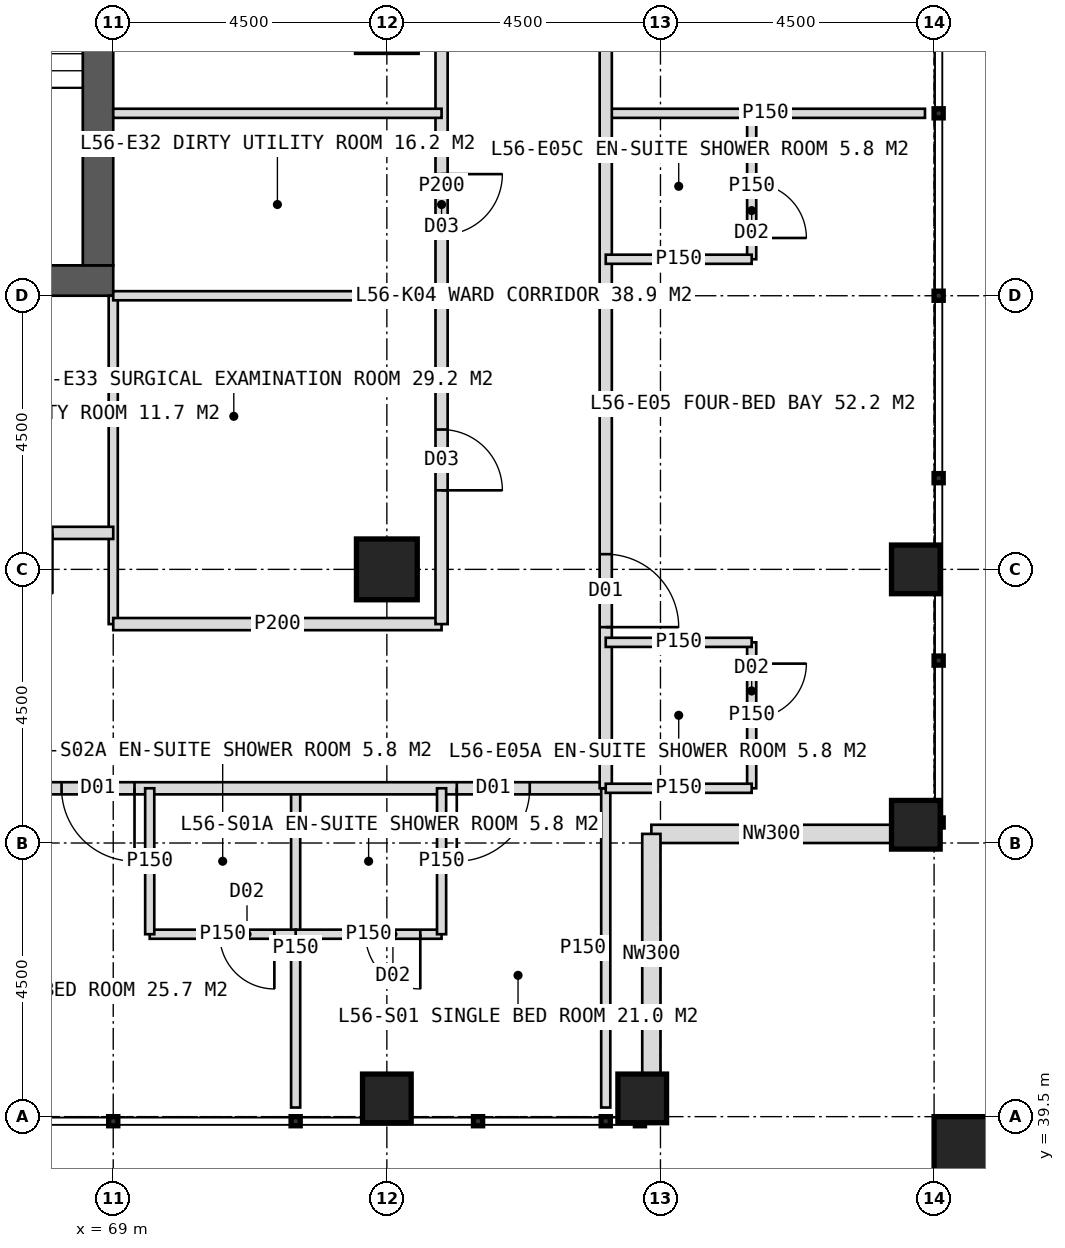
"""IFC4 building model, lengths in metres.
Left out: names, types, materials, properties, quantities, classifications, styles, units other than length and angle.
Written with IfcOpenShell. Run it as: python <this file> out.ifc"""

import sys

from ifc_helpers import new_model, si_unit, direction, frame, frame_2d, origin, origin_2d, place, context, subcontext, project, spatial, rectangle, hollow_rectangle, extrude, element, fill, save


model = new_model("IFC4")
c1 = context("Model", 3, precision=1e-05, world=origin(), true_north=direction((0.0, 1.0)))
c2 = subcontext(c1, "Body", "Model", "MODEL_VIEW")
j1 = project(units=[si_unit("LENGTHUNIT", "METRE"), si_unit("PLANEANGLEUNIT", "RADIAN")], contexts=[c1])
p1 = place(None, origin())
s1 = spatial("IfcSite", under=j1, at=p1, CompositionType="ELEMENT")
p2 = place(p1, origin())
s2 = spatial("IfcBuilding", under=s1, at=p2, CompositionType="ELEMENT")
p3 = place(p2, frame((0.0, 0.0, 233.0)))
s3 = spatial("IfcBuildingStorey", under=s2, at=p3, CompositionType="ELEMENT", Elevation=233.0)
p4 = place(p3, frame((51.0, 53.25, 0.0), z_axis=(0.0, 0.0, 1.0), x_axis=(1.0, 0.0, 0.0)))
e1 = element("IfcWall", 1, at=p4, inside=s3, PredefinedType="SHEAR", context=c2, shape_type="SweptSolid", body=[
    extrude(rectangle(XDim=18.0, YDim=0.5, at=frame_2d((9.0, 0.0))), origin(), (0.0, 0.0, 1.0), 4.0),
])
p5 = place(p4, frame((8.1, 0.0, 0.0)))
e2 = element("IfcOpeningElement", 2, at=p5, cuts=e1, PredefinedType="OPENING", context=c2, shape_type="SweptSolid", body=[
    extrude(rectangle(XDim=1.8, YDim=2.2, at=frame_2d((0.9, 1.1))), frame((0.0, 0.26, 0.0), z_axis=(0.0, -1.0, 0.0), x_axis=(1.0, 0.0, 0.0)), (0.0, 0.0, 1.0), 0.52),
])
p6 = place(p3, frame((68.75, 53.5, 0.0), z_axis=(0.0, 0.0, 1.0), x_axis=(0.0, 1.0, 0.0)))
e3 = element("IfcWall", 3, at=p6, inside=s3, PredefinedType="SHEAR", context=c2, shape_type="SweptSolid", body=[
    extrude(rectangle(XDim=17.0, YDim=0.5, at=frame_2d((8.5, 0.0))), origin(), (0.0, 0.0, 1.0), 4.0),
])
p7 = place(p6, frame((9.6, 0.0, 0.0)))
e4 = element("IfcOpeningElement", 4, at=p7, cuts=e3, PredefinedType="OPENING", context=c2, shape_type="SweptSolid", body=[
    extrude(rectangle(XDim=1.5, YDim=2.2, at=frame_2d((0.75, 1.1))), frame((0.0, 0.26, 0.0), z_axis=(0.0, -1.0, 0.0), x_axis=(1.0, 0.0, 0.0)), (0.0, 0.0, 1.0), 0.52),
])
p8 = place(p3, frame((73.5, 48.5, 0.0), z_axis=(0.0, 0.0, 1.0), x_axis=(1.0, 0.0, 0.0)))
e5 = element("IfcColumn", 5, at=p8, inside=s3, PredefinedType="COLUMN", context=c2, shape_type="SweptSolid", body=[
    extrude(hollow_rectangle(XDim=1.0, YDim=1.0, WallThickness=0.1, at=origin_2d()), origin(), (0.0, 0.0, 1.0), 4.0),
])
for number, where, z_axis, x_axis in (
    (6, (82.2, 44.3, 0.0), (0.0, 0.0, 1.0), (1.0, 0.0, 0.0)),
    (7, (82.2, 48.5, 0.0), (0.0, 0.0, 1.0), (1.0, 0.0, 0.0)),
    (8, (73.5, 39.8, 0.0), (0.0, 0.0, 1.0), (1.0, 0.0, 0.0)),
    (9, (77.7, 39.8, 0.0), (0.0, 0.0, 1.0), (1.0, 0.0, 0.0)),
):
    element("IfcColumn", number, at=place(p3, frame(where, z_axis=z_axis, x_axis=x_axis)), inside=s3, PredefinedType="COLUMN", context=c2, shape_type="SweptSolid", body=[
        extrude(hollow_rectangle(XDim=0.8, YDim=0.8, WallThickness=0.08, at=origin_2d()), origin(), (0.0, 0.0, 1.0), 4.0),
    ])
p9 = place(p3, frame((83.1, 38.9, 0.0), z_axis=(0.0, 0.0, 1.0), x_axis=(1.0, 0.0, 0.0)))
e10 = element("IfcColumn", 10, at=p9, inside=s3, PredefinedType="COLUMN", context=c2, shape_type="SweptSolid", body=[
    extrude(hollow_rectangle(XDim=1.2, YDim=1.2, WallThickness=0.07, at=origin_2d()), origin(), (0.0, 0.0, 1.0), 4.0),
])
for number, where, z_axis, x_axis in (
    (11, (81.8, 44.15, 0.0), (0.0, 0.0, 1.0), (-1.0, 0.0, 0.0)),
    (12, (77.85, 44.15, 0.0), (0.0, 0.0, 1.0), (0.0, -1.0, 0.0)),
):
    element("IfcWall", number, at=place(p3, frame(where, z_axis=z_axis, x_axis=x_axis)), inside=s3, PredefinedType="ELEMENTEDWALL", context=c2, shape_type="SweptSolid", body=[
        extrude(rectangle(XDim=3.95, YDim=0.3, at=frame_2d((1.975, 0.0))), origin(), (0.0, 0.0, 1.0), 2.85),
    ])
p10 = place(p3, frame((72.0, 44.9, 0.0), z_axis=(0.0, 0.0, 1.0), x_axis=(0.0, -1.0, 0.0)))
e13 = element("IfcWall", 13, at=p10, inside=s3, PredefinedType="PARTITIONING", context=c2, shape_type="SweptSolid", body=[
    extrude(rectangle(XDim=5.25, YDim=0.15, at=frame_2d((2.625, 0.0))), origin(), (0.0, 0.0, 1.0), 3.75),
])
p11 = place(p3, frame((77.1, 44.9, 0.0), z_axis=(0.0, 0.0, 1.0), x_axis=(-1.0, 0.0, 0.0)))
e14 = element("IfcWall", 14, at=p11, inside=s3, PredefinedType="PARTITIONING", context=c2, shape_type="SweptSolid", body=[
    extrude(rectangle(XDim=34.2, YDim=0.2, at=frame_2d((17.1, 0.0))), origin(), (0.0, 0.0, 1.0), 3.75),
])
p12 = place(p11, frame((1.25, 0.0, 0.0)))
e15 = element("IfcOpeningElement", 15, at=p12, cuts=e14, PredefinedType="OPENING", context=c2, shape_type="SweptSolid", body=[
    extrude(rectangle(XDim=1.2, YDim=2.2, at=frame_2d((0.6, 1.1))), frame((0.0, 0.11, 0.0), z_axis=(0.0, -1.0, 0.0), x_axis=(1.0, 0.0, 0.0)), (0.0, 0.0, 1.0), 0.22),
])
p13 = place(p11, frame((7.75, 0.0, 0.0)))
e16 = element("IfcOpeningElement", 16, at=p13, cuts=e14, PredefinedType="OPENING", context=c2, shape_type="SweptSolid", body=[
    extrude(rectangle(XDim=1.2, YDim=2.2, at=frame_2d((0.6, 1.1))), frame((0.0, 0.11, 0.0), z_axis=(0.0, -1.0, 0.0), x_axis=(1.0, 0.0, 0.0)), (0.0, 0.0, 1.0), 0.22),
])
p14 = place(p11, frame((13.25, 0.0, 0.0)))
e17 = element("IfcOpeningElement", 17, at=p14, cuts=e14, PredefinedType="OPENING", context=c2, shape_type="SweptSolid", body=[
    extrude(rectangle(XDim=1.2, YDim=2.2, at=frame_2d((0.6, 1.1))), frame((0.0, 0.11, 0.0), z_axis=(0.0, -1.0, 0.0), x_axis=(1.0, 0.0, 0.0)), (0.0, 0.0, 1.0), 0.22),
])
p15 = place(p11, frame((19.75, 0.0, 0.0)))
e18 = element("IfcOpeningElement", 18, at=p15, cuts=e14, PredefinedType="OPENING", context=c2, shape_type="SweptSolid", body=[
    extrude(rectangle(XDim=1.2, YDim=2.2, at=frame_2d((0.6, 1.1))), frame((0.0, 0.11, 0.0), z_axis=(0.0, -1.0, 0.0), x_axis=(1.0, 0.0, 0.0)), (0.0, 0.0, 1.0), 0.22),
])
p16 = place(p11, frame((30.35, 0.0, 0.0)))
e19 = element("IfcOpeningElement", 19, at=p16, cuts=e14, PredefinedType="OPENING", context=c2, shape_type="SweptSolid", body=[
    extrude(rectangle(XDim=1.2, YDim=2.2, at=frame_2d((0.6, 1.1))), frame((0.0, 0.11, 0.0), z_axis=(0.0, -1.0, 0.0), x_axis=(1.0, 0.0, 0.0)), (0.0, 0.0, 1.0), 0.22),
])
p17 = place(p3, frame((77.1, 44.9, 0.0), z_axis=(0.0, 0.0, 1.0), x_axis=(0.0, -1.0, 0.0)))
e20 = element("IfcWall", 20, at=p17, inside=s3, PredefinedType="PARTITIONING", context=c2, shape_type="SweptSolid", body=[
    extrude(rectangle(XDim=5.25, YDim=0.15, at=frame_2d((2.625, 0.0))), origin(), (0.0, 0.0, 1.0), 3.75),
])
p18 = place(p3, frame((74.4, 42.5, 0.0), z_axis=(0.0, 0.0, 1.0), x_axis=(-1.0, 0.0, 0.0)))
e21 = element("IfcWall", 21, at=p18, inside=s3, PredefinedType="PARTITIONING", context=c2, shape_type="SweptSolid", body=[
    extrude(rectangle(XDim=2.4, YDim=0.15, at=frame_2d((1.2, 0.0))), origin(), (0.0, 0.0, 1.0), 3.75),
])
p19 = place(p18, frame((0.35, 0.0, 0.0)))
e22 = element("IfcOpeningElement", 22, at=p19, cuts=e21, PredefinedType="OPENING", context=c2, shape_type="SweptSolid", body=[
    extrude(rectangle(XDim=0.9, YDim=2.1, at=frame_2d((0.45, 1.05))), frame((0.0, 0.085, 0.0), z_axis=(0.0, -1.0, 0.0), x_axis=(1.0, 0.0, 0.0)), (0.0, 0.0, 1.0), 0.17),
])
p20 = place(p3, frame((74.4, 44.9, 0.0), z_axis=(0.0, 0.0, 1.0), x_axis=(0.0, -1.0, 0.0)))
e23 = element("IfcWall", 23, at=p20, inside=s3, PredefinedType="PARTITIONING", context=c2, shape_type="SweptSolid", body=[
    extrude(rectangle(XDim=2.4, YDim=0.15, at=frame_2d((1.2, 0.0))), origin(), (0.0, 0.0, 1.0), 3.75),
])
p21 = place(p3, frame((72.0, 42.5, 0.0), z_axis=(0.0, 0.0, 1.0), x_axis=(-1.0, 0.0, 0.0)))
e24 = element("IfcWall", 24, at=p21, inside=s3, PredefinedType="PARTITIONING", context=c2, shape_type="SweptSolid", body=[
    extrude(rectangle(XDim=2.4, YDim=0.15, at=frame_2d((1.2, 0.0))), origin(), (0.0, 0.0, 1.0), 3.75),
])
p22 = place(p21, frame((0.35, 0.0, 0.0)))
e25 = element("IfcOpeningElement", 25, at=p22, cuts=e24, PredefinedType="OPENING", context=c2, shape_type="SweptSolid", body=[
    extrude(rectangle(XDim=0.9, YDim=2.1, at=frame_2d((0.45, 1.05))), frame((0.0, 0.085, 0.0), z_axis=(0.0, -1.0, 0.0), x_axis=(1.0, 0.0, 0.0)), (0.0, 0.0, 1.0), 0.17),
])
p23 = place(p3, frame((69.6, 44.9, 0.0), z_axis=(0.0, 0.0, 1.0), x_axis=(0.0, -1.0, 0.0)))
e26 = element("IfcWall", 26, at=p23, inside=s3, PredefinedType="PARTITIONING", context=c2, shape_type="SweptSolid", body=[
    extrude(rectangle(XDim=2.4, YDim=0.15, at=frame_2d((1.2, 0.0))), origin(), (0.0, 0.0, 1.0), 3.75),
])
p24 = place(p3, frame((69.0, 53.0, 0.0), z_axis=(0.0, 0.0, 1.0), x_axis=(0.0, -1.0, 0.0)))
e27 = element("IfcWall", 27, at=p24, inside=s3, PredefinedType="PARTITIONING", context=c2, shape_type="SweptSolid", body=[
    extrude(rectangle(XDim=5.4, YDim=0.15, at=frame_2d((2.7, 0.0))), origin(), (0.0, 0.0, 1.0), 3.75),
])
p25 = place(p3, frame((74.4, 47.6, 0.0), z_axis=(0.0, 0.0, 1.0), x_axis=(-1.0, 0.0, 0.0)))
e28 = element("IfcWall", 28, at=p25, inside=s3, PredefinedType="PARTITIONING", context=c2, shape_type="SweptSolid", body=[
    extrude(rectangle(XDim=5.4, YDim=0.2, at=frame_2d((2.7, 0.0))), origin(), (0.0, 0.0, 1.0), 3.75),
])
p26 = place(p3, frame((69.0, 49.1, 0.0), z_axis=(0.0, 0.0, 1.0), x_axis=(-1.0, 0.0, 0.0)))
e29 = element("IfcWall", 29, at=p26, inside=s3, PredefinedType="PARTITIONING", context=c2, shape_type="SweptSolid", body=[
    extrude(rectangle(XDim=6.75, YDim=0.2, at=frame_2d((3.375, 0.0))), origin(), (0.0, 0.0, 1.0), 3.75),
])
p27 = place(p26, frame((1.0, 0.0, 0.0)))
e30 = element("IfcOpeningElement", 30, at=p27, cuts=e29, PredefinedType="OPENING", context=c2, shape_type="SweptSolid", body=[
    extrude(rectangle(XDim=1.0, YDim=2.1, at=frame_2d((0.5, 1.05))), frame((0.0, 0.11, 0.0), z_axis=(0.0, -1.0, 0.0), x_axis=(1.0, 0.0, 0.0)), (0.0, 0.0, 1.0), 0.22),
])
p28 = place(p26, frame((5.425, 0.0, 0.0)))
e31 = element("IfcOpeningElement", 31, at=p28, cuts=e29, PredefinedType="OPENING", context=c2, shape_type="SweptSolid", body=[
    extrude(rectangle(XDim=1.0, YDim=2.1, at=frame_2d((0.5, 1.05))), frame((0.0, 0.11, 0.0), z_axis=(0.0, -1.0, 0.0), x_axis=(1.0, 0.0, 0.0)), (0.0, 0.0, 1.0), 0.22),
])
p29 = place(p3, frame((77.1, 56.0, 0.0), z_axis=(0.0, 0.0, 1.0), x_axis=(1.0, 0.0, 0.0)))
e32 = element("IfcWall", 32, at=p29, inside=s3, PredefinedType="PARTITIONING", context=c2, shape_type="SweptSolid", body=[
    extrude(rectangle(XDim=5.25, YDim=0.15, at=frame_2d((2.625, 0.0))), origin(), (0.0, 0.0, 1.0), 3.75),
])
p30 = place(p3, frame((77.1, 79.1, 0.0), z_axis=(0.0, 0.0, 1.0), x_axis=(0.0, -1.0, 0.0)))
e33 = element("IfcWall", 33, at=p30, inside=s3, PredefinedType="PARTITIONING", context=c2, shape_type="SweptSolid", body=[
    extrude(rectangle(XDim=34.2, YDim=0.2, at=frame_2d((17.1, 0.0))), origin(), (0.0, 0.0, 1.0), 3.75),
])
p31 = place(p30, frame((3.65, 0.0, 0.0)))
e34 = element("IfcOpeningElement", 34, at=p31, cuts=e33, PredefinedType="OPENING", context=c2, shape_type="SweptSolid", body=[
    extrude(rectangle(XDim=1.2, YDim=2.2, at=frame_2d((0.6, 1.1))), frame((0.0, 0.11, 0.0), z_axis=(0.0, -1.0, 0.0), x_axis=(1.0, 0.0, 0.0)), (0.0, 0.0, 1.0), 0.22),
])
p32 = place(p30, frame((10.75, 0.0, 0.0)))
e35 = element("IfcOpeningElement", 35, at=p32, cuts=e33, PredefinedType="OPENING", context=c2, shape_type="SweptSolid", body=[
    extrude(rectangle(XDim=1.2, YDim=2.2, at=frame_2d((0.6, 1.1))), frame((0.0, 0.11, 0.0), z_axis=(0.0, -1.0, 0.0), x_axis=(1.0, 0.0, 0.0)), (0.0, 0.0, 1.0), 0.22),
])
p33 = place(p30, frame((15.1, 0.0, 0.0)))
e36 = element("IfcOpeningElement", 36, at=p33, cuts=e33, PredefinedType="OPENING", context=c2, shape_type="SweptSolid", body=[
    extrude(rectangle(XDim=1.0, YDim=2.1, at=frame_2d((0.5, 1.05))), frame((0.0, 0.11, 0.0), z_axis=(0.0, -1.0, 0.0), x_axis=(1.0, 0.0, 0.0)), (0.0, 0.0, 1.0), 0.22),
])
p34 = place(p30, frame((19.75, 0.0, 0.0)))
e37 = element("IfcOpeningElement", 37, at=p34, cuts=e33, PredefinedType="OPENING", context=c2, shape_type="SweptSolid", body=[
    extrude(rectangle(XDim=1.2, YDim=2.2, at=frame_2d((0.6, 1.1))), frame((0.0, 0.11, 0.0), z_axis=(0.0, -1.0, 0.0), x_axis=(1.0, 0.0, 0.0)), (0.0, 0.0, 1.0), 0.22),
])
p35 = place(p30, frame((30.35, 0.0, 0.0)))
e38 = element("IfcOpeningElement", 38, at=p35, cuts=e33, PredefinedType="OPENING", context=c2, shape_type="SweptSolid", body=[
    extrude(rectangle(XDim=1.2, YDim=2.2, at=frame_2d((0.6, 1.1))), frame((0.0, 0.11, 0.0), z_axis=(0.0, -1.0, 0.0), x_axis=(1.0, 0.0, 0.0)), (0.0, 0.0, 1.0), 0.22),
])
p36 = place(p3, frame((79.5, 47.3, 0.0), z_axis=(0.0, 0.0, 1.0), x_axis=(0.0, -1.0, 0.0)))
e39 = element("IfcWall", 39, at=p36, inside=s3, PredefinedType="PARTITIONING", context=c2, shape_type="SweptSolid", body=[
    extrude(rectangle(XDim=2.4, YDim=0.15, at=frame_2d((1.2, 0.0))), origin(), (0.0, 0.0, 1.0), 3.75),
])
p37 = place(p36, frame((0.35, 0.0, 0.0)))
e40 = element("IfcOpeningElement", 40, at=p37, cuts=e39, PredefinedType="OPENING", context=c2, shape_type="SweptSolid", body=[
    extrude(rectangle(XDim=0.9, YDim=2.1, at=frame_2d((0.45, 1.05))), frame((0.0, 0.085, 0.0), z_axis=(0.0, -1.0, 0.0), x_axis=(1.0, 0.0, 0.0)), (0.0, 0.0, 1.0), 0.17),
])
p38 = place(p3, frame((77.1, 47.3, 0.0), z_axis=(0.0, 0.0, 1.0), x_axis=(1.0, 0.0, 0.0)))
e41 = element("IfcWall", 41, at=p38, inside=s3, PredefinedType="PARTITIONING", context=c2, shape_type="SweptSolid", body=[
    extrude(rectangle(XDim=2.4, YDim=0.15, at=frame_2d((1.2, 0.0))), origin(), (0.0, 0.0, 1.0), 3.75),
])
p39 = place(p3, frame((79.5, 56.0, 0.0), z_axis=(0.0, 0.0, 1.0), x_axis=(0.0, -1.0, 0.0)))
e42 = element("IfcWall", 42, at=p39, inside=s3, PredefinedType="PARTITIONING", context=c2, shape_type="SweptSolid", body=[
    extrude(rectangle(XDim=2.4, YDim=0.15, at=frame_2d((1.2, 0.0))), origin(), (0.0, 0.0, 1.0), 3.75),
])
p40 = place(p39, frame((1.15, 0.0, 0.0)))
e43 = element("IfcOpeningElement", 43, at=p40, cuts=e42, PredefinedType="OPENING", context=c2, shape_type="SweptSolid", body=[
    extrude(rectangle(XDim=0.9, YDim=2.1, at=frame_2d((0.45, 1.05))), frame((0.0, 0.085, 0.0), z_axis=(0.0, -1.0, 0.0), x_axis=(1.0, 0.0, 0.0)), (0.0, 0.0, 1.0), 0.17),
])
for number, where, z_axis, x_axis in (
    (44, (77.1, 53.6, 0.0), (0.0, 0.0, 1.0), (1.0, 0.0, 0.0)),
    (45, (77.1, 44.9, 0.0), (0.0, 0.0, 1.0), (1.0, 0.0, 0.0)),
):
    element("IfcWall", number, at=place(p3, frame(where, z_axis=z_axis, x_axis=x_axis)), inside=s3, PredefinedType="PARTITIONING", context=c2, shape_type="SweptSolid", body=[
        extrude(rectangle(XDim=2.4, YDim=0.15, at=frame_2d((1.2, 0.0))), origin(), (0.0, 0.0, 1.0), 3.75),
    ])
p41 = place(p3, frame((74.4, 62.0, 0.0), z_axis=(0.0, 0.0, 1.0), x_axis=(0.0, -1.0, 0.0)))
e46 = element("IfcWall", 46, at=p41, inside=s3, PredefinedType="PARTITIONING", context=c2, shape_type="SweptSolid", body=[
    extrude(rectangle(XDim=14.4, YDim=0.2, at=frame_2d((7.2, 0.0))), origin(), (0.0, 0.0, 1.0), 3.75),
])
p42 = place(p41, frame((2.5, 0.0, 0.0)))
e47 = element("IfcOpeningElement", 47, at=p42, cuts=e46, PredefinedType="OPENING", context=c2, shape_type="SweptSolid", body=[
    extrude(rectangle(XDim=1.0, YDim=2.1, at=frame_2d((0.5, 1.05))), frame((0.0, 0.11, 0.0), z_axis=(0.0, -1.0, 0.0), x_axis=(1.0, 0.0, 0.0)), (0.0, 0.0, 1.0), 0.22),
])
p43 = place(p41, frame((7.0, 0.0, 0.0)))
e48 = element("IfcOpeningElement", 48, at=p43, cuts=e46, PredefinedType="OPENING", context=c2, shape_type="SweptSolid", body=[
    extrude(rectangle(XDim=1.0, YDim=2.1, at=frame_2d((0.5, 1.05))), frame((0.0, 0.11, 0.0), z_axis=(0.0, -1.0, 0.0), x_axis=(1.0, 0.0, 0.0)), (0.0, 0.0, 1.0), 0.22),
])
p44 = place(p41, frame((11.2, 0.0, 0.0)))
e49 = element("IfcOpeningElement", 49, at=p44, cuts=e46, PredefinedType="OPENING", context=c2, shape_type="SweptSolid", body=[
    extrude(rectangle(XDim=1.0, YDim=2.1, at=frame_2d((0.5, 1.05))), frame((0.0, 0.11, 0.0), z_axis=(0.0, -1.0, 0.0), x_axis=(1.0, 0.0, 0.0)), (0.0, 0.0, 1.0), 0.22),
])
for number, where, z_axis, x_axis in (
    (50, (69.0, 56.0, 0.0), (0.0, 0.0, 1.0), (1.0, 0.0, 0.0)),
    (51, (69.0, 53.0, 0.0), (0.0, 0.0, 1.0), (1.0, 0.0, 0.0)),
):
    element("IfcWall", number, at=place(p3, frame(where, z_axis=z_axis, x_axis=x_axis)), inside=s3, PredefinedType="PARTITIONING", context=c2, shape_type="SweptSolid", body=[
        extrude(rectangle(XDim=5.4, YDim=0.15, at=frame_2d((2.7, 0.0))), origin(), (0.0, 0.0, 1.0), 3.75),
    ])
p45 = place(p12, origin())
e52 = element("IfcDoor", 52, at=p45, inside=s3, OperationType="SINGLE_SWING_RIGHT", PredefinedType="DOOR", context=c2, shape_type="SweptSolid", body=[
    extrude(rectangle(XDim=1.2, YDim=2.2, at=frame_2d((0.6, 1.1))), frame((0.0, 0.025, 0.0), z_axis=(0.0, -1.0, 0.0), x_axis=(1.0, 0.0, 0.0)), (0.0, 0.0, 1.0), 0.05),
])
fill(e15, e52)
p46 = place(p19, origin())
e53 = element("IfcDoor", 53, at=p46, inside=s3, OperationType="SINGLE_SWING_LEFT", PredefinedType="DOOR", context=c2, shape_type="SweptSolid", body=[
    extrude(rectangle(XDim=0.9, YDim=2.1, at=frame_2d((0.45, 1.05))), frame((0.0, 0.025, 0.0), z_axis=(0.0, -1.0, 0.0), x_axis=(1.0, 0.0, 0.0)), (0.0, 0.0, 1.0), 0.05),
])
fill(e22, e53)
p47 = place(p13, origin())
e54 = element("IfcDoor", 54, at=p47, inside=s3, OperationType="SINGLE_SWING_LEFT", PredefinedType="DOOR", context=c2, shape_type="SweptSolid", body=[
    extrude(rectangle(XDim=1.2, YDim=2.2, at=frame_2d((0.6, 1.1))), frame((0.0, 0.025, 0.0), z_axis=(0.0, -1.0, 0.0), x_axis=(1.0, 0.0, 0.0)), (0.0, 0.0, 1.0), 0.05),
])
fill(e16, e54)
p48 = place(p22, origin())
e55 = element("IfcDoor", 55, at=p48, inside=s3, OperationType="SINGLE_SWING_LEFT", PredefinedType="DOOR", context=c2, shape_type="SweptSolid", body=[
    extrude(rectangle(XDim=0.9, YDim=2.1, at=frame_2d((0.45, 1.05))), frame((0.0, 0.025, 0.0), z_axis=(0.0, -1.0, 0.0), x_axis=(1.0, 0.0, 0.0)), (0.0, 0.0, 1.0), 0.05),
])
fill(e25, e55)
p49 = place(p35, origin())
e56 = element("IfcDoor", 56, at=p49, inside=s3, OperationType="SINGLE_SWING_RIGHT", PredefinedType="DOOR", context=c2, shape_type="SweptSolid", body=[
    extrude(rectangle(XDim=1.2, YDim=2.2, at=frame_2d((0.6, 1.1))), frame((0.0, 0.025, 0.0), z_axis=(0.0, -1.0, 0.0), x_axis=(1.0, 0.0, 0.0)), (0.0, 0.0, 1.0), 0.05),
])
fill(e38, e56)
p50 = place(p37, origin())
e57 = element("IfcDoor", 57, at=p50, inside=s3, OperationType="SINGLE_SWING_LEFT", PredefinedType="DOOR", context=c2, shape_type="SweptSolid", body=[
    extrude(rectangle(XDim=0.9, YDim=2.1, at=frame_2d((0.45, 1.05))), frame((0.0, 0.025, 0.0), z_axis=(0.0, -1.0, 0.0), x_axis=(1.0, 0.0, 0.0)), (0.0, 0.0, 1.0), 0.05),
])
fill(e40, e57)
p51 = place(p40, origin())
e58 = element("IfcDoor", 58, at=p51, inside=s3, OperationType="SINGLE_SWING_RIGHT", PredefinedType="DOOR", context=c2, shape_type="SweptSolid", body=[
    extrude(rectangle(XDim=0.9, YDim=2.1, at=frame_2d((0.45, 1.05))), frame((0.0, 0.025, 0.0), z_axis=(0.0, -1.0, 0.0), x_axis=(1.0, 0.0, 0.0)), (0.0, 0.0, 1.0), 0.05),
])
fill(e43, e58)
p52 = place(p43, origin())
e59 = element("IfcDoor", 59, at=p52, inside=s3, OperationType="SINGLE_SWING_LEFT", PredefinedType="DOOR", context=c2, shape_type="SweptSolid", body=[
    extrude(rectangle(XDim=1.0, YDim=2.1, at=frame_2d((0.5, 1.05))), frame((0.0, 0.025, 0.0), z_axis=(0.0, -1.0, 0.0), x_axis=(1.0, 0.0, 0.0)), (0.0, 0.0, 1.0), 0.05),
])
fill(e48, e59)
p53 = place(p44, origin())
e60 = element("IfcDoor", 60, at=p53, inside=s3, OperationType="SINGLE_SWING_RIGHT", PredefinedType="DOOR", context=c2, shape_type="SweptSolid", body=[
    extrude(rectangle(XDim=1.0, YDim=2.1, at=frame_2d((0.5, 1.05))), frame((0.0, 0.025, 0.0), z_axis=(0.0, -1.0, 0.0), x_axis=(1.0, 0.0, 0.0)), (0.0, 0.0, 1.0), 0.05),
])
fill(e49, e60)
save(model, sys.argv[1])
